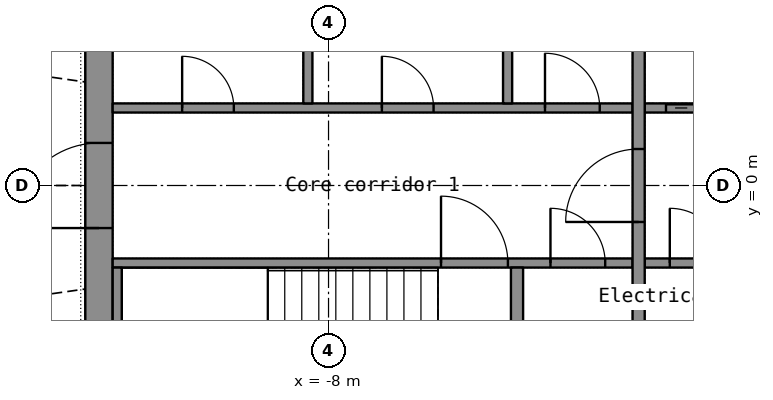
"""IFC4 building model, lengths in metres.
Left out: names, types, materials, properties, quantities, classifications, styles, units other than length and angle.
Written with IfcOpenShell. Run it as: python <this file> out.ifc"""

import sys

from ifc_helpers import new_model, si_unit, direction, frame, frame_2d, origin, place, context, subcontext, project, spatial, rectangle, extrude, element, fill, save


model = new_model("IFC4")
c1 = context("Model", 3, precision=1e-05, world=origin(), true_north=direction((0.0, 1.0)))
c2 = subcontext(c1, "Body", "Model", "MODEL_VIEW")
j1 = project(units=[si_unit("LENGTHUNIT", "METRE"), si_unit("PLANEANGLEUNIT", "RADIAN")], contexts=[c1])
p1 = place(None, origin())
s1 = spatial("IfcSite", under=j1, at=p1, CompositionType="ELEMENT")
p2 = place(p1, origin())
s2 = spatial("IfcBuilding", under=s1, at=p2, CompositionType="ELEMENT")
p3 = place(p2, frame((0.0, 0.0, 197.8)))
s3 = spatial("IfcBuildingStorey", under=s2, at=p3, CompositionType="ELEMENT", Elevation=197.8)
p4 = place(p3, frame((-11.775, -7.2, 0.0), z_axis=(0.0, 0.0, 1.0), x_axis=(0.0, 1.0, 0.0)))
e1 = element("IfcWall", 1, at=p4, inside=s3, PredefinedType="SHEAR", context=c2, shape_type="SweptSolid", body=[
    extrude(rectangle(XDim=14.4, YDim=0.45, at=frame_2d((7.2, 0.0))), origin(), (0.0, 0.0, 1.0), 3.3),
])
p5 = place(p4, frame((6.5, 0.0, 0.0)))
e2 = element("IfcOpeningElement", 2, at=p5, cuts=e1, PredefinedType="OPENING", context=c2, shape_type="SweptSolid", body=[
    extrude(rectangle(XDim=1.4, YDim=2.2, at=frame_2d((0.7, 1.1))), frame((0.0, 0.235, 0.0), z_axis=(0.0, -1.0, 0.0), x_axis=(1.0, 0.0, 0.0)), (0.0, 0.0, 1.0), 0.47),
])
p6 = place(p3, frame((-11.55, -1.275, 0.0), z_axis=(0.0, 0.0, 1.0), x_axis=(1.0, 0.0, 0.0)))
e3 = element("IfcWall", 3, at=p6, inside=s3, PredefinedType="SHEAR", context=c2, shape_type="SweptSolid", body=[
    extrude(rectangle(XDim=8.55, YDim=0.15, at=frame_2d((4.275, 0.0))), origin(), (0.0, 0.0, 1.0), 3.3),
])
p7 = place(p6, frame((5.4, 0.0, 0.0)))
e4 = element("IfcOpeningElement", 4, at=p7, cuts=e3, PredefinedType="OPENING", context=c2, shape_type="SweptSolid", body=[
    extrude(rectangle(XDim=1.1, YDim=2.15, at=frame_2d((0.55, 1.075))), frame((0.0, 0.085, 0.0), z_axis=(0.0, -1.0, 0.0), x_axis=(1.0, 0.0, 0.0)), (0.0, 0.0, 1.0), 0.17),
])
p8 = place(p6, frame((7.2, 0.0, 0.0)))
e5 = element("IfcOpeningElement", 5, at=p8, cuts=e3, PredefinedType="OPENING", context=c2, shape_type="SweptSolid", body=[
    extrude(rectangle(XDim=0.9, YDim=2.1, at=frame_2d((0.45, 1.05))), frame((0.0, 0.085, 0.0), z_axis=(0.0, -1.0, 0.0), x_axis=(1.0, 0.0, 0.0)), (0.0, 0.0, 1.0), 0.17),
])
p9 = place(p3, frame((-2.8, -1.275, 0.0), z_axis=(0.0, 0.0, 1.0), x_axis=(1.0, 0.0, 0.0)))
e6 = element("IfcWall", 6, at=p9, inside=s3, PredefinedType="SHEAR", context=c2, shape_type="SweptSolid", body=[
    extrude(rectangle(XDim=5.6, YDim=0.15, at=frame_2d((2.8, 0.0))), origin(), (0.0, 0.0, 1.0), 3.3),
])
p10 = place(p9, frame((4.15, 0.0, 0.0)))
e7 = element("IfcOpeningElement", 7, at=p10, cuts=e6, PredefinedType="OPENING", context=c2, shape_type="SweptSolid", body=[
    extrude(rectangle(XDim=1.1, YDim=2.2, at=frame_2d((0.55, 1.1))), frame((0.0, 0.085, 0.0), z_axis=(0.0, -1.0, 0.0), x_axis=(1.0, 0.0, 0.0)), (0.0, 0.0, 1.0), 0.17),
])
p11 = place(p9, frame((0.413, 0.0, 0.0)))
e8 = element("IfcOpeningElement", 8, at=p11, cuts=e6, PredefinedType="OPENING", context=c2, shape_type="SweptSolid", body=[
    extrude(rectangle(XDim=0.9, YDim=2.1, at=frame_2d((0.45, 1.05))), frame((0.0, 0.085, 0.0), z_axis=(0.0, -1.0, 0.0), x_axis=(1.0, 0.0, 0.0)), (0.0, 0.0, 1.0), 0.17),
])
p12 = place(p9, frame((2.288, 0.0, 0.0)))
e9 = element("IfcOpeningElement", 9, at=p12, cuts=e6, PredefinedType="OPENING", context=c2, shape_type="SweptSolid", body=[
    extrude(rectangle(XDim=0.9, YDim=2.1, at=frame_2d((0.45, 1.05))), frame((0.0, 0.085, 0.0), z_axis=(0.0, -1.0, 0.0), x_axis=(1.0, 0.0, 0.0)), (0.0, 0.0, 1.0), 0.17),
])
p13 = place(p3, frame((-11.55, 1.275, 0.0), z_axis=(0.0, 0.0, 1.0), x_axis=(1.0, 0.0, 0.0)))
e10 = element("IfcWall", 10, at=p13, inside=s3, PredefinedType="PARTITIONING", context=c2, shape_type="SweptSolid", body=[
    extrude(rectangle(XDim=8.55, YDim=0.15, at=frame_2d((4.275, 0.0))), origin(), (0.0, 0.0, 1.0), 3.3),
])
p14 = place(p13, frame((1.143, 0.0, 0.0)))
e11 = element("IfcOpeningElement", 11, at=p14, cuts=e10, PredefinedType="OPENING", context=c2, shape_type="SweptSolid", body=[
    extrude(rectangle(XDim=0.85, YDim=2.1, at=frame_2d((0.425, 1.05))), frame((0.0, 0.085, 0.0), z_axis=(0.0, -1.0, 0.0), x_axis=(1.0, 0.0, 0.0)), (0.0, 0.0, 1.0), 0.17),
])
p15 = place(p13, frame((4.427, 0.0, 0.0)))
e12 = element("IfcOpeningElement", 12, at=p15, cuts=e10, PredefinedType="OPENING", context=c2, shape_type="SweptSolid", body=[
    extrude(rectangle(XDim=0.85, YDim=2.1, at=frame_2d((0.425, 1.05))), frame((0.0, 0.085, 0.0), z_axis=(0.0, -1.0, 0.0), x_axis=(1.0, 0.0, 0.0)), (0.0, 0.0, 1.0), 0.17),
])
p16 = place(p13, frame((7.11, 0.0, 0.0)))
e13 = element("IfcOpeningElement", 13, at=p16, cuts=e10, PredefinedType="OPENING", context=c2, shape_type="SweptSolid", body=[
    extrude(rectangle(XDim=0.9, YDim=2.1, at=frame_2d((0.45, 1.05))), frame((0.0, 0.085, 0.0), z_axis=(0.0, -1.0, 0.0), x_axis=(1.0, 0.0, 0.0)), (0.0, 0.0, 1.0), 0.17),
])
p17 = place(p3, frame((-2.8, 1.275, 0.0), z_axis=(0.0, 0.0, 1.0), x_axis=(1.0, 0.0, 0.0)))
e14 = element("IfcWall", 14, at=p17, inside=s3, PredefinedType="SHEAR", context=c2, shape_type="SweptSolid", body=[
    extrude(rectangle(XDim=5.6, YDim=0.15, at=frame_2d((2.8, 0.0))), origin(), (0.0, 0.0, 1.0), 3.3),
])
p18 = place(p17, frame((0.35, 0.0, 0.0)))
e15 = element("IfcOpeningElement", 15, at=p18, cuts=e14, PredefinedType="OPENING", context=c2, shape_type="SweptSolid", body=[
    extrude(rectangle(XDim=1.1, YDim=2.2, at=frame_2d((0.55, 1.1))), frame((0.0, 0.085, 0.0), z_axis=(0.0, -1.0, 0.0), x_axis=(1.0, 0.0, 0.0)), (0.0, 0.0, 1.0), 0.17),
])
p19 = place(p17, frame((3.35, 0.0, 0.0)))
e16 = element("IfcOpeningElement", 16, at=p19, cuts=e14, PredefinedType="OPENING", context=c2, shape_type="SweptSolid", body=[
    extrude(rectangle(XDim=0.9, YDim=2.1, at=frame_2d((0.45, 1.05))), frame((0.0, 0.085, 0.0), z_axis=(0.0, -1.0, 0.0), x_axis=(1.0, 0.0, 0.0)), (0.0, 0.0, 1.0), 0.17),
])
p20 = place(p3, frame((-2.9, -3.7, 0.0), z_axis=(0.0, 0.0, 1.0), x_axis=(0.0, 1.0, 0.0)))
e17 = element("IfcWall", 17, at=p20, inside=s3, PredefinedType="SHEAR", context=c2, shape_type="SweptSolid", body=[
    extrude(rectangle(XDim=7.4, YDim=0.2, at=frame_2d((3.7, 0.0))), origin(), (0.0, 0.0, 1.0), 3.3),
])
p21 = place(p20, frame((3.1, 0.0, 0.0)))
e18 = element("IfcOpeningElement", 18, at=p21, cuts=e17, PredefinedType="OPENING", context=c2, shape_type="SweptSolid", body=[
    extrude(rectangle(XDim=1.2, YDim=2.2, at=frame_2d((0.6, 1.1))), frame((0.0, 0.11, 0.0), z_axis=(0.0, -1.0, 0.0), x_axis=(1.0, 0.0, 0.0)), (0.0, 0.0, 1.0), 0.22),
])
p22 = place(p3, frame((-11.475, -3.7, 0.0), z_axis=(0.0, 0.0, 1.0), x_axis=(0.0, 1.0, 0.0)))
e19 = element("IfcWall", 19, at=p22, inside=s3, PredefinedType="SHEAR", context=c2, shape_type="SweptSolid", body=[
    extrude(rectangle(XDim=2.35, YDim=0.15, at=frame_2d((1.175, 0.0))), origin(), (0.0, 0.0, 1.0), 3.3),
])
p23 = place(p3, frame((-4.9, -3.7, 0.0), z_axis=(0.0, 0.0, 1.0), x_axis=(0.0, 1.0, 0.0)))
e20 = element("IfcWall", 20, at=p23, inside=s3, PredefinedType="SHEAR", context=c2, shape_type="SweptSolid", body=[
    extrude(rectangle(XDim=2.35, YDim=0.2, at=frame_2d((1.175, 0.0))), origin(), (0.0, 0.0, 1.0), 3.3),
])
for number, where, z_axis, x_axis in (
    (21, (-8.34, 1.35, 0.0), (0.0, 0.0, 1.0), (0.0, 1.0, 0.0)),
    (22, (-5.055, 1.35, 0.0), (0.0, 0.0, 1.0), (0.0, 1.0, 0.0)),
):
    element("IfcWall", number, at=place(p3, frame(where, z_axis=z_axis, x_axis=x_axis)), inside=s3, PredefinedType="PARTITIONING", context=c2, shape_type="SweptSolid", body=[
        extrude(rectangle(XDim=2.35, YDim=0.15, at=frame_2d((1.175, 0.0))), origin(), (0.0, 0.0, 1.0), 3.3),
    ])
p24 = place(p5, origin())
e23 = element("IfcDoor", 23, at=p24, inside=s3, OperationType="DOUBLE_DOOR_SINGLE_SWING", PredefinedType="DOOR", context=c2, shape_type="SweptSolid", body=[
    extrude(rectangle(XDim=1.4, YDim=2.2, at=frame_2d((0.7, 1.1))), frame((0.0, 0.025, 0.0), z_axis=(0.0, -1.0, 0.0), x_axis=(1.0, 0.0, 0.0)), (0.0, 0.0, 1.0), 0.05),
])
fill(e2, e23)
p25 = place(p21, origin())
e24 = element("IfcDoor", 24, at=p25, inside=s3, OperationType="SINGLE_SWING_LEFT", PredefinedType="DOOR", context=c2, shape_type="SweptSolid", body=[
    extrude(rectangle(XDim=1.2, YDim=2.2, at=frame_2d((0.6, 1.1))), frame((0.0, 0.025, 0.0), z_axis=(0.0, -1.0, 0.0), x_axis=(1.0, 0.0, 0.0)), (0.0, 0.0, 1.0), 0.05),
])
fill(e18, e24)
p26 = place(p18, origin())
e25 = element("IfcDoor", 25, at=p26, inside=s3, OperationType="DOUBLE_DOOR_SLIDING", PredefinedType="DOOR", context=c2, shape_type="SweptSolid", body=[
    extrude(rectangle(XDim=1.1, YDim=2.2, at=frame_2d((0.55, 1.1))), frame((0.0, 0.025, 0.0), z_axis=(0.0, -1.0, 0.0), x_axis=(1.0, 0.0, 0.0)), (0.0, 0.0, 1.0), 0.05),
])
fill(e15, e25)
p27 = place(p7, origin())
e26 = element("IfcDoor", 26, at=p27, inside=s3, OperationType="SINGLE_SWING_LEFT", PredefinedType="DOOR", context=c2, shape_type="SweptSolid", body=[
    extrude(rectangle(XDim=1.1, YDim=2.15, at=frame_2d((0.55, 1.075))), frame((0.0, 0.025, 0.0), z_axis=(0.0, -1.0, 0.0), x_axis=(1.0, 0.0, 0.0)), (0.0, 0.0, 1.0), 0.05),
])
fill(e4, e26)
p28 = place(p14, origin())
e27 = element("IfcDoor", 27, at=p28, inside=s3, OperationType="SINGLE_SWING_LEFT", PredefinedType="DOOR", context=c2, shape_type="SweptSolid", body=[
    extrude(rectangle(XDim=0.85, YDim=2.1, at=frame_2d((0.425, 1.05))), frame((0.0, 0.025, 0.0), z_axis=(0.0, -1.0, 0.0), x_axis=(1.0, 0.0, 0.0)), (0.0, 0.0, 1.0), 0.05),
])
fill(e11, e27)
p29 = place(p15, origin())
e28 = element("IfcDoor", 28, at=p29, inside=s3, OperationType="SINGLE_SWING_LEFT", PredefinedType="DOOR", context=c2, shape_type="SweptSolid", body=[
    extrude(rectangle(XDim=0.85, YDim=2.1, at=frame_2d((0.425, 1.05))), frame((0.0, 0.025, 0.0), z_axis=(0.0, -1.0, 0.0), x_axis=(1.0, 0.0, 0.0)), (0.0, 0.0, 1.0), 0.05),
])
fill(e12, e28)
p30 = place(p16, origin())
e29 = element("IfcDoor", 29, at=p30, inside=s3, OperationType="SINGLE_SWING_LEFT", PredefinedType="DOOR", context=c2, shape_type="SweptSolid", body=[
    extrude(rectangle(XDim=0.9, YDim=2.1, at=frame_2d((0.45, 1.05))), frame((0.0, 0.025, 0.0), z_axis=(0.0, -1.0, 0.0), x_axis=(1.0, 0.0, 0.0)), (0.0, 0.0, 1.0), 0.05),
])
fill(e13, e29)
p31 = place(p11, origin())
e30 = element("IfcDoor", 30, at=p31, inside=s3, OperationType="SINGLE_SWING_LEFT", PredefinedType="DOOR", context=c2, shape_type="SweptSolid", body=[
    extrude(rectangle(XDim=0.9, YDim=2.1, at=frame_2d((0.45, 1.05))), frame((0.0, 0.025, 0.0), z_axis=(0.0, -1.0, 0.0), x_axis=(1.0, 0.0, 0.0)), (0.0, 0.0, 1.0), 0.05),
])
fill(e8, e30)
p32 = place(p8, origin())
e31 = element("IfcDoor", 31, at=p32, inside=s3, OperationType="SINGLE_SWING_LEFT", PredefinedType="DOOR", context=c2, shape_type="SweptSolid", body=[
    extrude(rectangle(XDim=0.9, YDim=2.1, at=frame_2d((0.45, 1.05))), frame((0.0, 0.025, 0.0), z_axis=(0.0, -1.0, 0.0), x_axis=(1.0, 0.0, 0.0)), (0.0, 0.0, 1.0), 0.05),
])
fill(e5, e31)
save(model, sys.argv[1])
